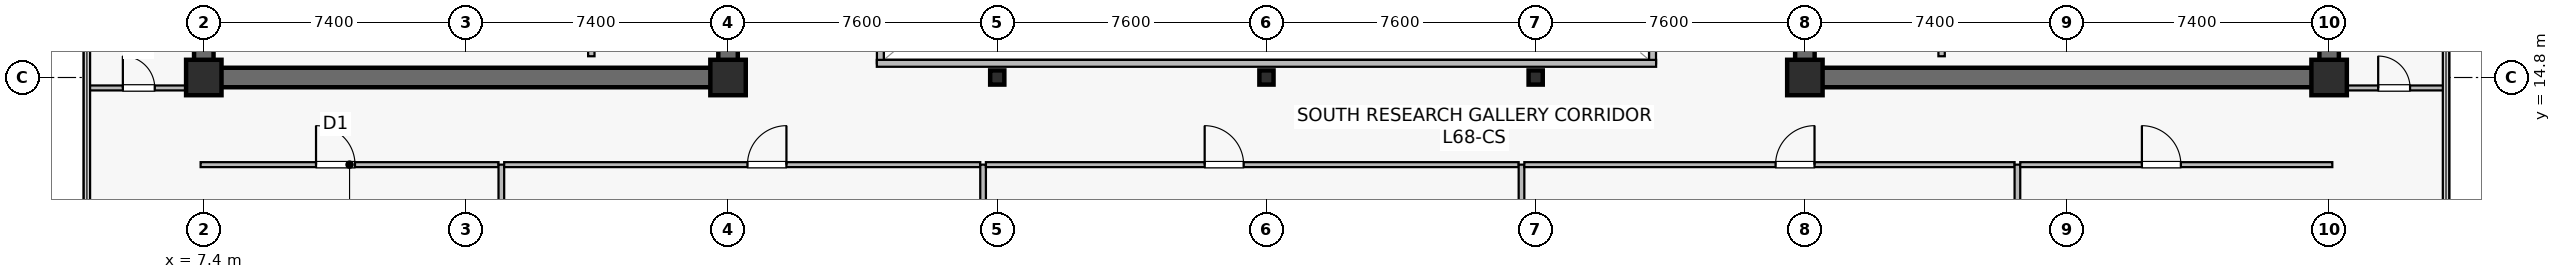
"""IFC4 building model, lengths in metres.
Left out: names, types, materials, properties, quantities, classifications, styles, units other than length and angle.
Written with IfcOpenShell. Run it as: python <this file> out.ifc"""

import sys

from ifc_helpers import new_model, si_unit, direction, frame, frame_2d, origin, origin_2d, place, context, subcontext, project, spatial, rectangle, hollow_rectangle, extrude, source, transform, mapped, element, fill, save


model = new_model("IFC4")
c1 = context("Model", 3, precision=1e-05, world=origin(), true_north=direction((0.0, 1.0)))
c2 = subcontext(c1, "Body", "Model", "MODEL_VIEW")
j1 = project(units=[si_unit("LENGTHUNIT", "METRE"), si_unit("PLANEANGLEUNIT", "RADIAN")], contexts=[c1])
p1 = place(None, origin())
s1 = spatial("IfcSite", under=j1, at=p1, CompositionType="ELEMENT")
p2 = place(p1, origin())
s2 = spatial("IfcBuilding", under=s1, at=p2, CompositionType="ELEMENT")
p3 = place(p2, frame((0.0, 0.0, 283.4)))
s3 = spatial("IfcBuildingStorey", under=s2, at=p3, CompositionType="ELEMENT", Elevation=283.4)
p4 = place(p3, frame((7.125, 14.8, 0.0), z_axis=(0.0, 0.0, 1.0), x_axis=(1.0, 0.0, 0.0)))
e1 = element("IfcWall", 1, at=p4, inside=s3, PredefinedType="SHEAR", context=c2, shape_type="SweptSolid", body=[
    extrude(rectangle(XDim=15.35, YDim=0.55, at=frame_2d((7.675, 0.0))), origin(), (0.0, 0.0, 1.0), 3.8),
])
p5 = place(p3, frame((7.4, 15.075, 0.0), z_axis=(0.0, 0.0, 1.0), x_axis=(0.0, 1.0, 0.0)))
e2 = element("IfcWall", 2, at=p5, inside=s3, PredefinedType="SHEAR", context=c2, shape_type="SweptSolid", body=[
    extrude(rectangle(XDim=18.45, YDim=0.55, at=frame_2d((9.225, 0.0))), origin(), (0.0, 0.0, 1.0), 3.8),
])
p6 = place(p3, frame((22.2, 15.075, 0.0), z_axis=(0.0, 0.0, 1.0), x_axis=(0.0, 1.0, 0.0)))
e3 = element("IfcWall", 3, at=p6, inside=s3, PredefinedType="SHEAR", context=c2, shape_type="SweptSolid", body=[
    extrude(rectangle(XDim=18.45, YDim=0.55, at=frame_2d((9.225, 0.0))), origin(), (0.0, 0.0, 1.0), 3.8),
])
p7 = place(p6, frame((3.475, 0.0, 0.0)))
e4 = element("IfcOpeningElement", 4, at=p7, cuts=e3, PredefinedType="OPENING", context=c2, shape_type="SweptSolid", body=[
    extrude(rectangle(XDim=1.42, YDim=2.2, at=frame_2d((0.71, 1.1))), frame((0.0, 0.285, 0.0), z_axis=(0.0, -1.0, 0.0), x_axis=(1.0, 0.0, 0.0)), (0.0, 0.0, 1.0), 0.57),
])
p8 = place(p3, frame((52.325, 14.8, 0.0), z_axis=(0.0, 0.0, 1.0), x_axis=(1.0, 0.0, 0.0)))
e5 = element("IfcWall", 5, at=p8, inside=s3, PredefinedType="SHEAR", context=c2, shape_type="SweptSolid", body=[
    extrude(rectangle(XDim=15.35, YDim=0.55, at=frame_2d((7.675, 0.0))), origin(), (0.0, 0.0, 1.0), 3.8),
])
p9 = place(p3, frame((52.6, 15.075, 0.0), z_axis=(0.0, 0.0, 1.0), x_axis=(0.0, 1.0, 0.0)))
e6 = element("IfcWall", 6, at=p9, inside=s3, PredefinedType="SHEAR", context=c2, shape_type="SweptSolid", body=[
    extrude(rectangle(XDim=18.45, YDim=0.55, at=frame_2d((9.225, 0.0))), origin(), (0.0, 0.0, 1.0), 3.8),
])
p10 = place(p9, frame((3.475, 0.0, 0.0)))
e7 = element("IfcOpeningElement", 7, at=p10, cuts=e6, PredefinedType="OPENING", context=c2, shape_type="SweptSolid", body=[
    extrude(rectangle(XDim=1.42, YDim=2.2, at=frame_2d((0.71, 1.1))), frame((0.0, 0.285, 0.0), z_axis=(0.0, -1.0, 0.0), x_axis=(1.0, 0.0, 0.0)), (0.0, 0.0, 1.0), 0.57),
])
p11 = place(p3, frame((67.4, 15.075, 0.0), z_axis=(0.0, 0.0, 1.0), x_axis=(0.0, 1.0, 0.0)))
e8 = element("IfcWall", 8, at=p11, inside=s3, PredefinedType="SHEAR", context=c2, shape_type="SweptSolid", body=[
    extrude(rectangle(XDim=18.45, YDim=0.55, at=frame_2d((9.225, 0.0))), origin(), (0.0, 0.0, 1.0), 3.8),
])
m1 = source(origin(), c2, "Body", "SweptSolid", [
    extrude(rectangle(XDim=1.0, YDim=1.0, at=origin_2d()), origin(), (0.0, 0.0, 1.0), 4.1),
])
for number, where, z_axis, x_axis in (
    (9, (7.4, 14.8, 0.0), (0.0, 0.0, 1.0), (1.0, 0.0, 0.0)),
    (10, (22.2, 14.8, 0.0), (0.0, 0.0, 1.0), (1.0, 0.0, 0.0)),
    (11, (52.6, 14.8, 0.0), (0.0, 0.0, 1.0), (1.0, 0.0, 0.0)),
    (12, (67.4, 14.8, 0.0), (0.0, 0.0, 1.0), (1.0, 0.0, 0.0)),
):
    element("IfcColumn", number, at=place(p3, frame(where, z_axis=z_axis, x_axis=x_axis)), inside=s3, PredefinedType="COLUMN", context=c2, shape_type="MappedRepresentation", body=[
        mapped(m1, transform((0.0, 0.0, 0.0), scale=1.0)),
    ])
m2 = source(origin(), c2, "Body", "SweptSolid", [
    extrude(hollow_rectangle(XDim=0.4, YDim=0.4, WallThickness=0.019, at=origin_2d()), origin(), (0.0, 0.0, 1.0), 4.1),
])
for number, where, z_axis, x_axis in (
    (13, (29.8, 14.8, 0.0), (0.0, 0.0, 1.0), (1.0, 0.0, 0.0)),
    (14, (37.4, 14.8, 0.0), (0.0, 0.0, 1.0), (1.0, 0.0, 0.0)),
    (15, (45.0, 14.8, 0.0), (0.0, 0.0, 1.0), (1.0, 0.0, 0.0)),
):
    element("IfcColumn", number, at=place(p3, frame(where, z_axis=z_axis, x_axis=x_axis)), inside=s3, PredefinedType="COLUMN", context=c2, shape_type="MappedRepresentation", body=[
        mapped(m2, transform((0.0, 0.0, 0.0), scale=1.0)),
    ])
for number, where, z_axis, x_axis in (
    (16, (18.34, 15.4, 0.0), (0.0, 0.0, 1.0), (0.0, 1.0, 0.0)),
    (17, (56.46, 15.4, 0.0), (0.0, 0.0, 1.0), (0.0, 1.0, 0.0)),
):
    element("IfcWall", number, at=place(p3, frame(where, z_axis=z_axis, x_axis=x_axis)), inside=s3, PredefinedType="SOLIDWALL", context=c2, shape_type="SweptSolid", body=[
        extrude(rectangle(XDim=2.4, YDim=0.18, at=frame_2d((1.2, 0.0))), origin(), (0.0, 0.0, 1.0), 3.8),
    ])
p12 = place(p3, frame((26.5, 15.2, 0.0), z_axis=(0.0, 0.0, 1.0), x_axis=(0.0, 1.0, 0.0)))
e18 = element("IfcWall", 18, at=p12, inside=s3, PredefinedType="SOLIDWALL", context=c2, shape_type="SweptSolid", body=[
    extrude(rectangle(XDim=18.2, YDim=0.195, at=frame_2d((9.1, 0.0))), origin(), (0.0, 0.0, 1.0), 3.8),
])
p13 = place(p12, frame((1.8, 0.0, 0.9)))
e19 = element("IfcOpeningElement", 19, at=p13, cuts=e18, PredefinedType="OPENING", context=c2, shape_type="SweptSolid", body=[
    extrude(rectangle(XDim=1.5, YDim=1.4, at=frame_2d((0.75, 0.7))), frame((0.0, 0.107, 0.0), z_axis=(0.0, -1.0, 0.0), x_axis=(1.0, 0.0, 0.0)), (0.0, 0.0, 1.0), 0.215),
])
p14 = place(p12, frame((13.2, 0.0, 0.9)))
e20 = element("IfcOpeningElement", 20, at=p14, cuts=e18, PredefinedType="OPENING", context=c2, shape_type="SweptSolid", body=[
    extrude(rectangle(XDim=1.5, YDim=1.4, at=frame_2d((0.75, 0.7))), frame((0.0, 0.107, 0.0), z_axis=(0.0, -1.0, 0.0), x_axis=(1.0, 0.0, 0.0)), (0.0, 0.0, 1.0), 0.215),
])
p15 = place(p3, frame((48.3, 15.2, 0.0), z_axis=(0.0, 0.0, 1.0), x_axis=(0.0, 1.0, 0.0)))
e21 = element("IfcWall", 21, at=p15, inside=s3, PredefinedType="SOLIDWALL", context=c2, shape_type="SweptSolid", body=[
    extrude(rectangle(XDim=18.2, YDim=0.195, at=frame_2d((9.1, 0.0))), origin(), (0.0, 0.0, 1.0), 3.8),
])
p16 = place(p15, frame((1.8, 0.0, 0.9)))
e22 = element("IfcOpeningElement", 22, at=p16, cuts=e21, PredefinedType="OPENING", context=c2, shape_type="SweptSolid", body=[
    extrude(rectangle(XDim=1.5, YDim=1.4, at=frame_2d((0.75, 0.7))), frame((0.0, 0.107, 0.0), z_axis=(0.0, -1.0, 0.0), x_axis=(1.0, 0.0, 0.0)), (0.0, 0.0, 1.0), 0.215),
])
p17 = place(p15, frame((13.2, 0.0, 0.9)))
e23 = element("IfcOpeningElement", 23, at=p17, cuts=e21, PredefinedType="OPENING", context=c2, shape_type="SweptSolid", body=[
    extrude(rectangle(XDim=1.5, YDim=1.4, at=frame_2d((0.75, 0.7))), frame((0.0, 0.107, 0.0), z_axis=(0.0, -1.0, 0.0), x_axis=(1.0, 0.0, 0.0)), (0.0, 0.0, 1.0), 0.215),
])
p18 = place(p3, frame((26.4, 15.2, 0.0), z_axis=(0.0, 0.0, 1.0), x_axis=(1.0, 0.0, 0.0)))
e24 = element("IfcWall", 24, at=p18, inside=s3, PredefinedType="SOLIDWALL", context=c2, shape_type="SweptSolid", body=[
    extrude(rectangle(XDim=22.0, YDim=0.195, at=frame_2d((11.0, 0.0))), origin(), (0.0, 0.0, 1.0), 3.8),
])
p19 = place(p3, frame((7.31, 12.34, 0.0), z_axis=(0.0, 0.0, 1.0), x_axis=(1.0, 0.0, 0.0)))
e25 = element("IfcWall", 25, at=p19, inside=s3, PredefinedType="PARTITIONING", context=c2, shape_type="SweptSolid", body=[
    extrude(rectangle(XDim=8.41, YDim=0.14, at=frame_2d((4.205, 0.0))), origin(), (0.0, 0.0, 1.0), 3.197),
])
p20 = place(p19, frame((3.258, 0.0, 0.0)))
e26 = element("IfcOpeningElement", 26, at=p20, cuts=e25, PredefinedType="OPENING", context=c2, shape_type="SweptSolid", body=[
    extrude(rectangle(XDim=1.1, YDim=2.18, at=frame_2d((0.55, 1.09))), frame((0.0, 0.08, 0.0), z_axis=(0.0, -1.0, 0.0), x_axis=(1.0, 0.0, 0.0)), (0.0, 0.0, 1.0), 0.16),
])
p21 = place(p3, frame((15.8, 2.71, 0.0), z_axis=(0.0, 0.0, 1.0), x_axis=(0.0, 1.0, 0.0)))
e27 = element("IfcWall", 27, at=p21, inside=s3, PredefinedType="PARTITIONING", context=c2, shape_type="SweptSolid", body=[
    extrude(rectangle(XDim=9.63, YDim=0.16, at=frame_2d((4.815, 0.0))), origin(), (0.0, 0.0, 1.0), 3.135),
])
p22 = place(p3, frame((15.88, 12.34, 0.0), z_axis=(0.0, 0.0, 1.0), x_axis=(1.0, 0.0, 0.0)))
e28 = element("IfcWall", 28, at=p22, inside=s3, PredefinedType="PARTITIONING", context=c2, shape_type="SweptSolid", body=[
    extrude(rectangle(XDim=13.44, YDim=0.14, at=frame_2d((6.72, 0.0))), origin(), (0.0, 0.0, 1.0), 3.197),
])
p23 = place(p22, frame((6.868, 0.0, 0.0)))
e29 = element("IfcOpeningElement", 29, at=p23, cuts=e28, PredefinedType="OPENING", context=c2, shape_type="SweptSolid", body=[
    extrude(rectangle(XDim=1.1, YDim=2.18, at=frame_2d((0.55, 1.09))), frame((0.0, 0.08, 0.0), z_axis=(0.0, -1.0, 0.0), x_axis=(1.0, 0.0, 0.0)), (0.0, 0.0, 1.0), 0.16),
])
p24 = place(p3, frame((29.4, 3.91, 0.0), z_axis=(0.0, 0.0, 1.0), x_axis=(0.0, 1.0, 0.0)))
e30 = element("IfcWall", 30, at=p24, inside=s3, PredefinedType="PARTITIONING", context=c2, shape_type="SweptSolid", body=[
    extrude(rectangle(XDim=8.43, YDim=0.16, at=frame_2d((4.215, 0.0))), origin(), (0.0, 0.0, 1.0), 3.135),
])
p25 = place(p3, frame((29.48, 12.34, 0.0), z_axis=(0.0, 0.0, 1.0), x_axis=(1.0, 0.0, 0.0)))
e31 = element("IfcWall", 31, at=p25, inside=s3, PredefinedType="PARTITIONING", context=c2, shape_type="SweptSolid", body=[
    extrude(rectangle(XDim=15.04, YDim=0.14, at=frame_2d((7.52, 0.0))), origin(), (0.0, 0.0, 1.0), 3.197),
])
p26 = place(p25, frame((6.176, 0.0, 0.0)))
e32 = element("IfcOpeningElement", 32, at=p26, cuts=e31, PredefinedType="OPENING", context=c2, shape_type="SweptSolid", body=[
    extrude(rectangle(XDim=1.1, YDim=2.18, at=frame_2d((0.55, 1.09))), frame((0.0, 0.08, 0.0), z_axis=(0.0, -1.0, 0.0), x_axis=(1.0, 0.0, 0.0)), (0.0, 0.0, 1.0), 0.16),
])
p27 = place(p3, frame((44.6, 3.91, 0.0), z_axis=(0.0, 0.0, 1.0), x_axis=(0.0, 1.0, 0.0)))
e33 = element("IfcWall", 33, at=p27, inside=s3, PredefinedType="PARTITIONING", context=c2, shape_type="SweptSolid", body=[
    extrude(rectangle(XDim=8.43, YDim=0.16, at=frame_2d((4.215, 0.0))), origin(), (0.0, 0.0, 1.0), 3.135),
])
p28 = place(p3, frame((44.68, 12.34, 0.0), z_axis=(0.0, 0.0, 1.0), x_axis=(1.0, 0.0, 0.0)))
e34 = element("IfcWall", 34, at=p28, inside=s3, PredefinedType="PARTITIONING", context=c2, shape_type="SweptSolid", body=[
    extrude(rectangle(XDim=13.84, YDim=0.14, at=frame_2d((6.92, 0.0))), origin(), (0.0, 0.0, 1.0), 3.197),
])
p29 = place(p28, frame((7.092, 0.0, 0.0)))
e35 = element("IfcOpeningElement", 35, at=p29, cuts=e34, PredefinedType="OPENING", context=c2, shape_type="SweptSolid", body=[
    extrude(rectangle(XDim=1.1, YDim=2.18, at=frame_2d((0.55, 1.09))), frame((0.0, 0.08, 0.0), z_axis=(0.0, -1.0, 0.0), x_axis=(1.0, 0.0, 0.0)), (0.0, 0.0, 1.0), 0.16),
])
p30 = place(p3, frame((58.6, 2.71, 0.0), z_axis=(0.0, 0.0, 1.0), x_axis=(0.0, 1.0, 0.0)))
e36 = element("IfcWall", 36, at=p30, inside=s3, PredefinedType="PARTITIONING", context=c2, shape_type="SweptSolid", body=[
    extrude(rectangle(XDim=9.63, YDim=0.16, at=frame_2d((4.815, 0.0))), origin(), (0.0, 0.0, 1.0), 3.135),
])
p31 = place(p3, frame((58.68, 12.34, 0.0), z_axis=(0.0, 0.0, 1.0), x_axis=(1.0, 0.0, 0.0)))
e37 = element("IfcWall", 37, at=p31, inside=s3, PredefinedType="PARTITIONING", context=c2, shape_type="SweptSolid", body=[
    extrude(rectangle(XDim=8.81, YDim=0.14, at=frame_2d((4.405, 0.0))), origin(), (0.0, 0.0, 1.0), 3.197),
])
p32 = place(p31, frame((3.434, 0.0, 0.0)))
e38 = element("IfcOpeningElement", 38, at=p32, cuts=e37, PredefinedType="OPENING", context=c2, shape_type="SweptSolid", body=[
    extrude(rectangle(XDim=1.1, YDim=2.18, at=frame_2d((0.55, 1.09))), frame((0.0, 0.08, 0.0), z_axis=(0.0, -1.0, 0.0), x_axis=(1.0, 0.0, 0.0)), (0.0, 0.0, 1.0), 0.16),
])
p33 = place(p3, frame((4.11, 14.505, 0.0), z_axis=(0.0, 0.0, 1.0), x_axis=(1.0, 0.0, 0.0)))
e39 = element("IfcWall", 39, at=p33, inside=s3, PredefinedType="PARTITIONING", context=c2, shape_type="SweptSolid", body=[
    extrude(rectangle(XDim=2.91, YDim=0.14, at=frame_2d((1.455, 0.0))), origin(), (0.0, 0.0, 1.0), 3.8),
])
p34 = place(p33, frame((1.005, 0.0, 0.0)))
e40 = element("IfcOpeningElement", 40, at=p34, cuts=e39, PredefinedType="OPENING", context=c2, shape_type="SweptSolid", body=[
    extrude(rectangle(XDim=0.9, YDim=2.1, at=frame_2d((0.45, 1.05))), frame((0.0, 0.08, 0.0), z_axis=(0.0, -1.0, 0.0), x_axis=(1.0, 0.0, 0.0)), (0.0, 0.0, 1.0), 0.16),
])
p35 = place(p3, frame((67.78, 14.505, 0.0), z_axis=(0.0, 0.0, 1.0), x_axis=(1.0, 0.0, 0.0)))
e41 = element("IfcWall", 41, at=p35, inside=s3, PredefinedType="PARTITIONING", context=c2, shape_type="SweptSolid", body=[
    extrude(rectangle(XDim=2.91, YDim=0.14, at=frame_2d((1.455, 0.0))), origin(), (0.0, 0.0, 1.0), 3.8),
])
p36 = place(p35, frame((1.005, 0.0, 0.0)))
e42 = element("IfcOpeningElement", 42, at=p36, cuts=e41, PredefinedType="OPENING", context=c2, shape_type="SweptSolid", body=[
    extrude(rectangle(XDim=0.9, YDim=2.1, at=frame_2d((0.45, 1.05))), frame((0.0, 0.08, 0.0), z_axis=(0.0, -1.0, 0.0), x_axis=(1.0, 0.0, 0.0)), (0.0, 0.0, 1.0), 0.16),
])
m3 = source(origin(), c2, "Body", "SweptSolid", [
    extrude(rectangle(XDim=1.1, YDim=2.18, at=frame_2d((0.55, 1.09))), frame((0.0, 0.025, 0.0), z_axis=(0.0, -1.0, 0.0), x_axis=(1.0, 0.0, 0.0)), (0.0, 0.0, 1.0), 0.05),
])
p37 = place(p20, origin())
e43 = element("IfcDoor", 43, at=p37, inside=s3, OperationType="SINGLE_SWING_LEFT", PredefinedType="DOOR", context=c2, shape_type="MappedRepresentation", body=[
    mapped(m3, transform((0.0, 0.0, 0.0), scale=1.0)),
])
fill(e26, e43)
p38 = place(p23, origin())
e44 = element("IfcDoor", 44, at=p38, inside=s3, OperationType="SINGLE_SWING_RIGHT", PredefinedType="DOOR", context=c2, shape_type="MappedRepresentation", body=[
    mapped(m3, transform((0.0, 0.0, 0.0), scale=1.0)),
])
fill(e29, e44)
p39 = place(p26, origin())
e45 = element("IfcDoor", 45, at=p39, inside=s3, OperationType="SINGLE_SWING_LEFT", PredefinedType="DOOR", context=c2, shape_type="MappedRepresentation", body=[
    mapped(m3, transform((0.0, 0.0, 0.0), scale=1.0)),
])
fill(e32, e45)
p40 = place(p29, origin())
e46 = element("IfcDoor", 46, at=p40, inside=s3, OperationType="SINGLE_SWING_RIGHT", PredefinedType="DOOR", context=c2, shape_type="MappedRepresentation", body=[
    mapped(m3, transform((0.0, 0.0, 0.0), scale=1.0)),
])
fill(e35, e46)
p41 = place(p32, origin())
e47 = element("IfcDoor", 47, at=p41, inside=s3, OperationType="SINGLE_SWING_LEFT", PredefinedType="DOOR", context=c2, shape_type="MappedRepresentation", body=[
    mapped(m3, transform((0.0, 0.0, 0.0), scale=1.0)),
])
fill(e38, e47)
m4 = source(origin(), c2, "Body", "SweptSolid", [
    extrude(rectangle(XDim=0.9, YDim=2.1, at=frame_2d((0.45, 1.05))), frame((0.0, 0.025, 0.0), z_axis=(0.0, -1.0, 0.0), x_axis=(1.0, 0.0, 0.0)), (0.0, 0.0, 1.0), 0.05),
])
p42 = place(p34, origin())
e48 = element("IfcDoor", 48, at=p42, inside=s3, OperationType="SINGLE_SWING_LEFT", PredefinedType="DOOR", context=c2, shape_type="MappedRepresentation", body=[
    mapped(m4, transform((0.0, 0.0, 0.0), scale=1.0)),
])
fill(e40, e48)
p43 = place(p36, origin())
e49 = element("IfcDoor", 49, at=p43, inside=s3, OperationType="SINGLE_SWING_LEFT", PredefinedType="DOOR", context=c2, shape_type="MappedRepresentation", body=[
    mapped(m4, transform((0.0, 0.0, 0.0), scale=1.0)),
])
fill(e42, e49)
save(model, sys.argv[1])
